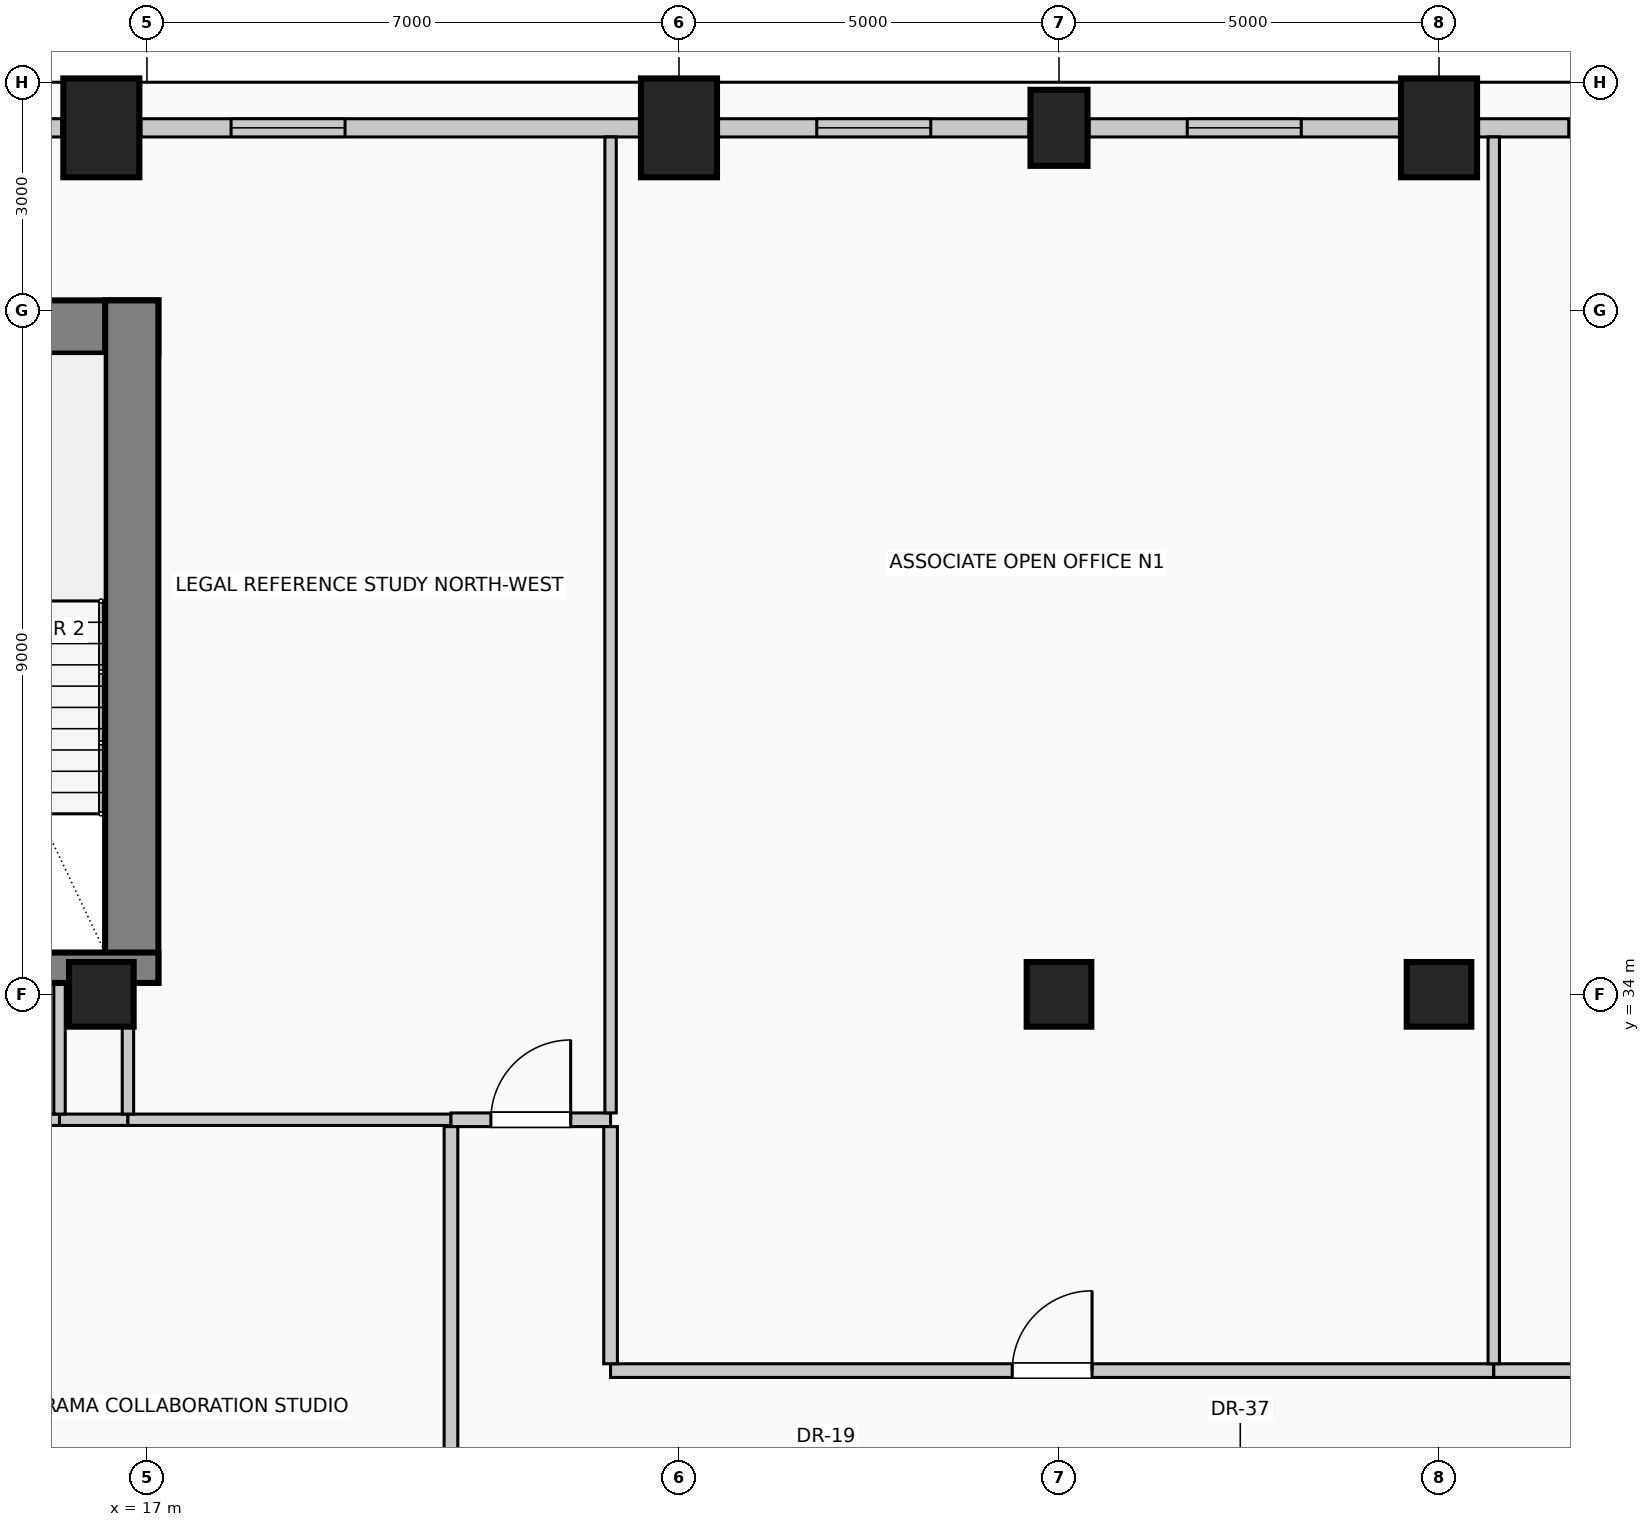
"""IFC4 building model, lengths in metres.
Left out: names, types, materials, properties, quantities, classifications, styles, units other than length and angle.
Written with IfcOpenShell. Run it as: python <this file> out.ifc"""

import sys

from ifc_helpers import new_model, si_unit, direction, frame, frame_2d, origin, origin_2d, place, context, subcontext, project, spatial, rectangle, circle, extrude, element, fill, save


model = new_model("IFC4")
c1 = context("Model", 3, precision=1e-05, world=origin(), true_north=direction((0.0, 1.0)))
c2 = subcontext(c1, "Body", "Model", "MODEL_VIEW")
j1 = project(units=[si_unit("LENGTHUNIT", "METRE"), si_unit("PLANEANGLEUNIT", "RADIAN")], contexts=[c1])
p1 = place(None, origin())
s1 = spatial("IfcSite", under=j1, at=p1, CompositionType="ELEMENT")
p2 = place(p1, origin())
s2 = spatial("IfcBuilding", under=s1, at=p2, CompositionType="ELEMENT")
p3 = place(p2, frame((0.0, 0.0, 234.6)))
s3 = spatial("IfcBuildingStorey", under=s2, at=p3, CompositionType="ELEMENT", Elevation=234.6)
p4 = place(p3, frame((2.85, 42.78, 0.0), z_axis=(0.0, 0.0, 1.0), x_axis=(1.0, 0.0, 0.0)))
e1 = element("IfcWall", 1, at=p4, inside=s3, PredefinedType="SHEAR", context=c2, shape_type="SweptSolid", body=[
    extrude(rectangle(XDim=14.3, YDim=0.7, at=frame_2d((7.15, 0.0))), origin(), (0.0, 0.0, 1.0), 4.0),
])
p5 = place(p3, frame((16.8, 34.15, 0.0), z_axis=(0.0, 0.0, 1.0), x_axis=(0.0, 1.0, 0.0)))
e2 = element("IfcWall", 2, at=p5, inside=s3, PredefinedType="SHEAR", context=c2, shape_type="SweptSolid", body=[
    extrude(rectangle(XDim=8.98, YDim=0.7, at=frame_2d((4.49, 0.0))), origin(), (0.0, 0.0, 1.0), 4.0),
])
p6 = place(p3, frame((12.29, 34.35, 0.0), z_axis=(0.0, 0.0, 1.0), x_axis=(1.0, 0.0, 0.0)))
e3 = element("IfcWall", 3, at=p6, inside=s3, PredefinedType="SHEAR", context=c2, shape_type="SweptSolid", body=[
    extrude(rectangle(XDim=4.86, YDim=0.4, at=frame_2d((2.43, 0.0))), origin(), (0.0, 0.0, 1.0), 4.0),
])
p7 = place(p6, frame((1.4, 0.0, 0.0)))
e4 = element("IfcOpeningElement", 4, at=p7, cuts=e3, PredefinedType="OPENING", context=c2, shape_type="SweptSolid", body=[
    extrude(rectangle(XDim=1.15, YDim=2.2, at=frame_2d((0.575, 1.1))), frame((0.0, 0.21, 0.0), z_axis=(0.0, -1.0, 0.0), x_axis=(1.0, 0.0, 0.0)), (0.0, 0.0, 1.0), 0.42),
])
for number, where, z_axis, x_axis in (
    (5, (16.4, 45.4, 0.0), (0.0, 0.0, 1.0), (1.0, 0.0, 0.0)),
    (6, (24.0, 45.4, 0.0), (0.0, 0.0, 1.0), (1.0, 0.0, 0.0)),
):
    element("IfcColumn", number, at=place(p3, frame(where, z_axis=z_axis, x_axis=x_axis)), inside=s3, PredefinedType="COLUMN", context=c2, shape_type="SweptSolid", body=[
        extrude(rectangle(XDim=1.0, YDim=1.3, at=origin_2d()), origin(), (0.0, 0.0, 1.0), 4.0),
    ])
p8 = place(p3, frame((29.0, 45.4, 0.0), z_axis=(0.0, 0.0, 1.0), x_axis=(1.0, 0.0, 0.0)))
e7 = element("IfcColumn", 7, at=p8, inside=s3, PredefinedType="COLUMN", context=c2, shape_type="SweptSolid", body=[
    extrude(rectangle(XDim=0.75, YDim=1.0, at=origin_2d()), origin(), (0.0, 0.0, 1.0), 4.0),
])
p9 = place(p3, frame((34.0, 45.4, 0.0), z_axis=(0.0, 0.0, 1.0), x_axis=(1.0, 0.0, 0.0)))
e8 = element("IfcColumn", 8, at=p9, inside=s3, PredefinedType="COLUMN", context=c2, shape_type="SweptSolid", body=[
    extrude(rectangle(XDim=1.0, YDim=1.3, at=origin_2d()), origin(), (0.0, 0.0, 1.0), 4.0),
])
for number, where, z_axis, x_axis in (
    (9, (16.4, 34.0, 0.0), (0.0, 0.0, 1.0), (1.0, 0.0, 0.0)),
    (10, (29.0, 34.0, 0.0), (0.0, 0.0, 1.0), (1.0, 0.0, 0.0)),
    (11, (34.0, 34.0, 0.0), (0.0, 0.0, 1.0), (1.0, 0.0, 0.0)),
):
    element("IfcColumn", number, at=place(p3, frame(where, z_axis=z_axis, x_axis=x_axis)), inside=s3, PredefinedType="COLUMN", context=c2, shape_type="SweptSolid", body=[
        extrude(circle(Radius=0.425, at=origin_2d()), origin(), (0.0, 0.0, 1.0), 4.0),
    ])
p10 = place(p3, frame((14.395, 45.4, 0.0), z_axis=(0.0, 0.0, 1.0), x_axis=(1.0, 0.0, 0.0)))
e12 = element("IfcWall", 12, at=p10, inside=s3, PredefinedType="SOLIDWALL", context=c2, shape_type="SweptSolid", body=[
    extrude(rectangle(XDim=1.485, YDim=0.24, at=frame_2d((0.742, 0.0))), origin(), (0.0, 0.0, 1.0), 2.91),
])
p11 = place(p3, frame((16.92, 45.4, 0.0), z_axis=(0.0, 0.0, 1.0), x_axis=(1.0, 0.0, 0.0)))
e13 = element("IfcWall", 13, at=p11, inside=s3, PredefinedType="SOLIDWALL", context=c2, shape_type="SweptSolid", body=[
    extrude(rectangle(XDim=6.56, YDim=0.24, at=frame_2d((3.28, 0.0))), origin(), (0.0, 0.0, 1.0), 2.91),
])
p12 = place(p11, frame((1.187, 0.0, 0.42)))
e14 = element("IfcOpeningElement", 14, at=p12, cuts=e13, PredefinedType="OPENING", context=c2, shape_type="SweptSolid", body=[
    extrude(rectangle(XDim=1.5, YDim=2.2, at=frame_2d((0.75, 1.1))), frame((0.0, 0.13, 0.0), z_axis=(0.0, -1.0, 0.0), x_axis=(1.0, 0.0, 0.0)), (0.0, 0.0, 1.0), 0.26),
])
p13 = place(p3, frame((24.52, 45.4, 0.0), z_axis=(0.0, 0.0, 1.0), x_axis=(1.0, 0.0, 0.0)))
e15 = element("IfcWall", 15, at=p13, inside=s3, PredefinedType="SOLIDWALL", context=c2, shape_type="SweptSolid", body=[
    extrude(rectangle(XDim=4.085, YDim=0.24, at=frame_2d((2.042, 0.0))), origin(), (0.0, 0.0, 1.0), 2.91),
])
p14 = place(p13, frame((1.292, 0.0, 0.42)))
e16 = element("IfcOpeningElement", 16, at=p14, cuts=e15, PredefinedType="OPENING", context=c2, shape_type="SweptSolid", body=[
    extrude(rectangle(XDim=1.5, YDim=2.2, at=frame_2d((0.75, 1.1))), frame((0.0, 0.13, 0.0), z_axis=(0.0, -1.0, 0.0), x_axis=(1.0, 0.0, 0.0)), (0.0, 0.0, 1.0), 0.26),
])
p15 = place(p3, frame((29.395, 45.4, 0.0), z_axis=(0.0, 0.0, 1.0), x_axis=(1.0, 0.0, 0.0)))
e17 = element("IfcWall", 17, at=p15, inside=s3, PredefinedType="SOLIDWALL", context=c2, shape_type="SweptSolid", body=[
    extrude(rectangle(XDim=4.085, YDim=0.24, at=frame_2d((2.042, 0.0))), origin(), (0.0, 0.0, 1.0), 2.91),
])
p16 = place(p15, frame((1.292, 0.0, 0.42)))
e18 = element("IfcOpeningElement", 18, at=p16, cuts=e17, PredefinedType="OPENING", context=c2, shape_type="SweptSolid", body=[
    extrude(rectangle(XDim=1.5, YDim=2.2, at=frame_2d((0.75, 1.1))), frame((0.0, 0.13, 0.0), z_axis=(0.0, -1.0, 0.0), x_axis=(1.0, 0.0, 0.0)), (0.0, 0.0, 1.0), 0.26),
])
p17 = place(p3, frame((34.52, 45.4, 0.0), z_axis=(0.0, 0.0, 1.0), x_axis=(1.0, 0.0, 0.0)))
e19 = element("IfcWall", 19, at=p17, inside=s3, PredefinedType="SOLIDWALL", context=c2, shape_type="SweptSolid", body=[
    extrude(rectangle(XDim=6.56, YDim=0.24, at=frame_2d((3.28, 0.0))), origin(), (0.0, 0.0, 1.0), 2.91),
])
p18 = place(p17, frame((1.187, 0.0, 0.42)))
e20 = element("IfcOpeningElement", 20, at=p18, cuts=e19, PredefinedType="OPENING", context=c2, shape_type="SweptSolid", body=[
    extrude(rectangle(XDim=1.5, YDim=2.2, at=frame_2d((0.75, 1.1))), frame((0.0, 0.13, 0.0), z_axis=(0.0, -1.0, 0.0), x_axis=(1.0, 0.0, 0.0)), (0.0, 0.0, 1.0), 0.26),
])
p19 = place(p17, frame((3.873, 0.0, 0.42)))
e21 = element("IfcOpeningElement", 21, at=p19, cuts=e19, PredefinedType="OPENING", context=c2, shape_type="SweptSolid", body=[
    extrude(rectangle(XDim=1.5, YDim=2.2, at=frame_2d((0.75, 1.1))), frame((0.0, 0.13, 0.0), z_axis=(0.0, -1.0, 0.0), x_axis=(1.0, 0.0, 0.0)), (0.0, 0.0, 1.0), 0.26),
])
p20 = place(p3, frame((23.1, 29.05, 0.0), z_axis=(0.0, 0.0, 1.0), x_axis=(1.0, 0.0, 0.0)))
e22 = element("IfcWall", 22, at=p20, inside=s3, PredefinedType="PARTITIONING", context=c2, shape_type="SweptSolid", body=[
    extrude(rectangle(XDim=11.62, YDim=0.18, at=frame_2d((5.81, 0.0))), origin(), (0.0, 0.0, 1.0), 3.66),
])
p21 = place(p20, frame((5.285, 0.0, 0.0)))
e23 = element("IfcOpeningElement", 23, at=p21, cuts=e22, PredefinedType="OPENING", context=c2, shape_type="SweptSolid", body=[
    extrude(rectangle(XDim=1.05, YDim=2.15, at=frame_2d((0.525, 1.075))), frame((0.0, 0.1, 0.0), z_axis=(0.0, -1.0, 0.0), x_axis=(1.0, 0.0, 0.0)), (0.0, 0.0, 1.0), 0.2),
])
p22 = place(p3, frame((34.72, 29.05, 0.0), z_axis=(0.0, 0.0, 1.0), x_axis=(1.0, 0.0, 0.0)))
e24 = element("IfcWall", 24, at=p22, inside=s3, PredefinedType="PARTITIONING", context=c2, shape_type="SweptSolid", body=[
    extrude(rectangle(XDim=6.83, YDim=0.18, at=frame_2d((3.415, 0.0))), origin(), (0.0, 0.0, 1.0), 3.66),
])
p23 = place(p22, frame((2.94, 0.0, 0.0)))
e25 = element("IfcOpeningElement", 25, at=p23, cuts=e24, PredefinedType="OPENING", context=c2, shape_type="SweptSolid", body=[
    extrude(rectangle(XDim=0.95, YDim=2.15, at=frame_2d((0.475, 1.075))), frame((0.0, 0.1, 0.0), z_axis=(0.0, -1.0, 0.0), x_axis=(1.0, 0.0, 0.0)), (0.0, 0.0, 1.0), 0.2),
])
p24 = place(p3, frame((12.33, 32.35, 0.0), z_axis=(0.0, 0.0, 1.0), x_axis=(1.0, 0.0, 0.0)))
e26 = element("IfcWall", 26, at=p24, inside=s3, PredefinedType="PARTITIONING", context=c2, shape_type="SweptSolid", body=[
    extrude(rectangle(XDim=3.52, YDim=0.15, at=frame_2d((1.76, 0.0))), origin(), (0.0, 0.0, 1.0), 3.66),
])
p25 = place(p24, frame((1.285, 0.0, 0.0)))
e27 = element("IfcOpeningElement", 27, at=p25, cuts=e26, PredefinedType="OPENING", context=c2, shape_type="SweptSolid", body=[
    extrude(rectangle(XDim=0.95, YDim=2.15, at=frame_2d((0.475, 1.075))), frame((0.0, 0.085, 0.0), z_axis=(0.0, -1.0, 0.0), x_axis=(1.0, 0.0, 0.0)), (0.0, 0.0, 1.0), 0.17),
])
p26 = place(p3, frame((15.85, 32.35, 0.0), z_axis=(0.0, 0.0, 1.0), x_axis=(1.0, 0.0, 0.0)))
e28 = element("IfcWall", 28, at=p26, inside=s3, PredefinedType="PARTITIONING", context=c2, shape_type="SweptSolid", body=[
    extrude(rectangle(XDim=0.9, YDim=0.15, at=frame_2d((0.45, 0.0))), origin(), (0.0, 0.0, 1.0), 3.66),
])
p27 = place(p3, frame((16.75, 32.35, 0.0), z_axis=(0.0, 0.0, 1.0), x_axis=(1.0, 0.0, 0.0)))
e29 = element("IfcWall", 29, at=p27, inside=s3, PredefinedType="PARTITIONING", context=c2, shape_type="SweptSolid", body=[
    extrude(rectangle(XDim=4.25, YDim=0.15, at=frame_2d((2.125, 0.0))), origin(), (0.0, 0.0, 1.0), 3.66),
])
p28 = place(p3, frame((21.0, 32.35, 0.0), z_axis=(0.0, 0.0, 1.0), x_axis=(1.0, 0.0, 0.0)))
e30 = element("IfcWall", 30, at=p28, inside=s3, PredefinedType="PARTITIONING", context=c2, shape_type="SweptSolid", body=[
    extrude(rectangle(XDim=2.1, YDim=0.18, at=frame_2d((1.05, 0.0))), origin(), (0.0, 0.0, 1.0), 3.66),
])
p29 = place(p28, frame((0.525, 0.0, 0.0)))
e31 = element("IfcOpeningElement", 31, at=p29, cuts=e30, PredefinedType="OPENING", context=c2, shape_type="SweptSolid", body=[
    extrude(rectangle(XDim=1.05, YDim=2.15, at=frame_2d((0.525, 1.075))), frame((0.0, 0.1, 0.0), z_axis=(0.0, -1.0, 0.0), x_axis=(1.0, 0.0, 0.0)), (0.0, 0.0, 1.0), 0.2),
])
p30 = place(p3, frame((15.85, 32.425, 0.0), z_axis=(0.0, 0.0, 1.0), x_axis=(0.0, 1.0, 0.0)))
e32 = element("IfcWall", 32, at=p30, inside=s3, PredefinedType="PARTITIONING", context=c2, shape_type="SweptSolid", body=[
    extrude(rectangle(XDim=1.725, YDim=0.15, at=frame_2d((0.862, 0.0))), origin(), (0.0, 0.0, 1.0), 3.66),
])
p31 = place(p3, frame((16.75, 32.425, 0.0), z_axis=(0.0, 0.0, 1.0), x_axis=(0.0, 1.0, 0.0)))
e33 = element("IfcWall", 33, at=p31, inside=s3, PredefinedType="PARTITIONING", context=c2, shape_type="SweptSolid", body=[
    extrude(rectangle(XDim=1.15, YDim=0.15, at=frame_2d((0.575, 0.0))), origin(), (0.0, 0.0, 1.0), 3.66),
])
p32 = place(p3, frame((21.0, 24.875, 0.0), z_axis=(0.0, 0.0, 1.0), x_axis=(0.0, 1.0, 0.0)))
e34 = element("IfcWall", 34, at=p32, inside=s3, PredefinedType="PARTITIONING", context=c2, shape_type="SweptSolid", body=[
    extrude(rectangle(XDim=7.385, YDim=0.18, at=frame_2d((3.692, 0.0))), origin(), (0.0, 0.0, 1.0), 3.66),
])
p33 = place(p3, frame((23.1, 29.14, 0.0), z_axis=(0.0, 0.0, 1.0), x_axis=(0.0, 1.0, 0.0)))
e35 = element("IfcWall", 35, at=p33, inside=s3, PredefinedType="PARTITIONING", context=c2, shape_type="SweptSolid", body=[
    extrude(rectangle(XDim=3.12, YDim=0.18, at=frame_2d((1.56, 0.0))), origin(), (0.0, 0.0, 1.0), 3.66),
])
p34 = place(p3, frame((23.1, 32.44, 0.0), z_axis=(0.0, 0.0, 1.0), x_axis=(0.0, 1.0, 0.0)))
e36 = element("IfcWall", 36, at=p34, inside=s3, PredefinedType="PARTITIONING", context=c2, shape_type="SweptSolid", body=[
    extrude(rectangle(XDim=12.84, YDim=0.15, at=frame_2d((6.42, 0.0))), origin(), (0.0, 0.0, 1.0), 3.66),
])
p35 = place(p3, frame((34.72, 29.14, 0.0), z_axis=(0.0, 0.0, 1.0), x_axis=(0.0, 1.0, 0.0)))
e37 = element("IfcWall", 37, at=p35, inside=s3, PredefinedType="PARTITIONING", context=c2, shape_type="SweptSolid", body=[
    extrude(rectangle(XDim=16.14, YDim=0.15, at=frame_2d((8.07, 0.0))), origin(), (0.0, 0.0, 1.0), 3.66),
])
p36 = place(p12, origin())
e38 = element("IfcWindow", 38, at=p36, inside=s3, PartitioningType="SINGLE_PANEL", PredefinedType="WINDOW", context=c2, shape_type="SweptSolid", body=[
    extrude(rectangle(XDim=1.5, YDim=2.2, at=frame_2d((0.75, 1.1))), frame((0.0, 0.03, 0.0), z_axis=(0.0, -1.0, 0.0), x_axis=(1.0, 0.0, 0.0)), (0.0, 0.0, 1.0), 0.06),
])
fill(e14, e38)
p37 = place(p14, origin())
e39 = element("IfcWindow", 39, at=p37, inside=s3, PartitioningType="SINGLE_PANEL", PredefinedType="WINDOW", context=c2, shape_type="SweptSolid", body=[
    extrude(rectangle(XDim=1.5, YDim=2.2, at=frame_2d((0.75, 1.1))), frame((0.0, 0.03, 0.0), z_axis=(0.0, -1.0, 0.0), x_axis=(1.0, 0.0, 0.0)), (0.0, 0.0, 1.0), 0.06),
])
fill(e16, e39)
p38 = place(p16, origin())
e40 = element("IfcWindow", 40, at=p38, inside=s3, PartitioningType="SINGLE_PANEL", PredefinedType="WINDOW", context=c2, shape_type="SweptSolid", body=[
    extrude(rectangle(XDim=1.5, YDim=2.2, at=frame_2d((0.75, 1.1))), frame((0.0, 0.03, 0.0), z_axis=(0.0, -1.0, 0.0), x_axis=(1.0, 0.0, 0.0)), (0.0, 0.0, 1.0), 0.06),
])
fill(e18, e40)
p39 = place(p18, origin())
e41 = element("IfcWindow", 41, at=p39, inside=s3, PartitioningType="SINGLE_PANEL", PredefinedType="WINDOW", context=c2, shape_type="SweptSolid", body=[
    extrude(rectangle(XDim=1.5, YDim=2.2, at=frame_2d((0.75, 1.1))), frame((0.0, 0.03, 0.0), z_axis=(0.0, -1.0, 0.0), x_axis=(1.0, 0.0, 0.0)), (0.0, 0.0, 1.0), 0.06),
])
fill(e20, e41)
p40 = place(p21, origin())
e42 = element("IfcDoor", 42, at=p40, inside=s3, OperationType="SINGLE_SWING_RIGHT", PredefinedType="DOOR", context=c2, shape_type="SweptSolid", body=[
    extrude(rectangle(XDim=1.05, YDim=2.15, at=frame_2d((0.525, 1.075))), frame((0.0, 0.025, 0.0), z_axis=(0.0, -1.0, 0.0), x_axis=(1.0, 0.0, 0.0)), (0.0, 0.0, 1.0), 0.05),
])
fill(e23, e42)
p41 = place(p29, origin())
e43 = element("IfcDoor", 43, at=p41, inside=s3, OperationType="SINGLE_SWING_RIGHT", PredefinedType="DOOR", context=c2, shape_type="SweptSolid", body=[
    extrude(rectangle(XDim=1.05, YDim=2.15, at=frame_2d((0.525, 1.075))), frame((0.0, 0.025, 0.0), z_axis=(0.0, -1.0, 0.0), x_axis=(1.0, 0.0, 0.0)), (0.0, 0.0, 1.0), 0.05),
])
fill(e31, e43)
save(model, sys.argv[1])
